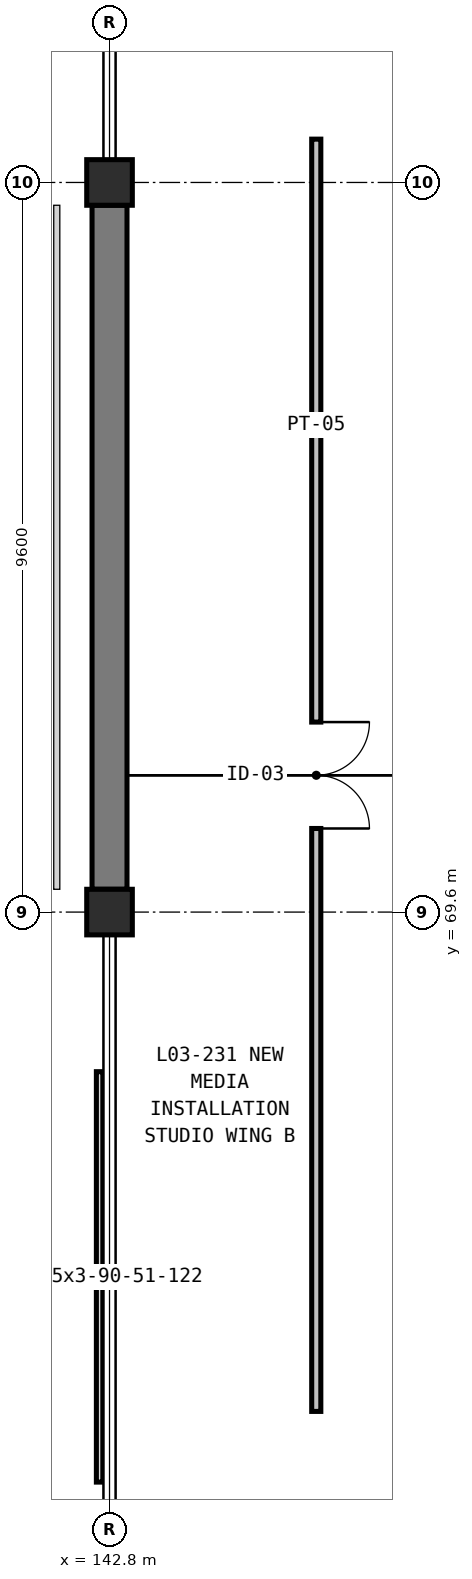
"""IFC4 building model, lengths in metres.
Left out: names, types, materials, properties, quantities, classifications, styles, units other than length and angle.
Written with IfcOpenShell. Run it as: python <this file> out.ifc"""

import sys

from ifc_helpers import new_model, si_unit, direction, frame, frame_2d, origin, origin_2d, place, context, subcontext, project, spatial, rectangle, extrude, element, fill, save


model = new_model("IFC4")
c1 = context("Model", 3, precision=1e-05, world=origin(), true_north=direction((0.0, 1.0)))
c2 = subcontext(c1, "Body", "Model", "MODEL_VIEW")
j1 = project(units=[si_unit("LENGTHUNIT", "METRE"), si_unit("PLANEANGLEUNIT", "RADIAN")], contexts=[c1])
p1 = place(None, origin())
s1 = spatial("IfcSite", under=j1, at=p1, CompositionType="ELEMENT")
p2 = place(p1, origin())
s2 = spatial("IfcBuilding", under=s1, at=p2, CompositionType="ELEMENT")
p3 = place(p2, frame((0.0, 0.0, 16.8)))
s3 = spatial("IfcBuildingStorey", under=s2, at=p3, CompositionType="ELEMENT", Elevation=16.8)
for number, where, z_axis, x_axis in (
    (1, (142.8, 69.6, 0.0), (0.0, 0.0, 1.0), (1.0, 0.0, 0.0)),
    (2, (142.8, 79.2, 0.0), (0.0, 0.0, 1.0), (1.0, 0.0, 0.0)),
):
    element("IfcColumn", number, at=place(p3, frame(where, z_axis=z_axis, x_axis=x_axis)), inside=s3, PredefinedType="COLUMN", context=c2, shape_type="SweptSolid", body=[
        extrude(rectangle(XDim=0.6, YDim=0.6, at=origin_2d()), origin(), (0.0, 0.0, 1.0), 5.4),
    ])
p4 = place(p3, frame((142.8, 69.9, 0.0), z_axis=(0.0, 0.0, 1.0), x_axis=(0.0, 1.0, 0.0)))
e3 = element("IfcWall", 3, at=p4, inside=s3, PredefinedType="SOLIDWALL", context=c2, shape_type="SweptSolid", body=[
    extrude(rectangle(XDim=9.0, YDim=0.46, at=frame_2d((4.5, 0.0))), origin(), (0.0, 0.0, 1.0), 5.1),
])
p5 = place(p3, frame((145.52, 79.77, 0.0), z_axis=(0.0, 0.0, 1.0), x_axis=(0.0, -1.0, 0.0)))
e4 = element("IfcWall", 4, at=p5, inside=s3, PredefinedType="PARTITIONING", context=c2, shape_type="SweptSolid", body=[
    extrude(rectangle(XDim=16.74, YDim=0.12, at=frame_2d((8.37, 0.0))), origin(), (0.0, 0.0, 1.0), 4.425),
])
p6 = place(p5, frame((7.67, 0.0, 0.0)))
e5 = element("IfcOpeningElement", 5, at=p6, cuts=e4, PredefinedType="OPENING", context=c2, shape_type="SweptSolid", body=[
    extrude(rectangle(XDim=1.4, YDim=2.3, at=frame_2d((0.7, 1.15))), frame((0.0, 0.07, 0.0), z_axis=(0.0, -1.0, 0.0), x_axis=(1.0, 0.0, 0.0)), (0.0, 0.0, 1.0), 0.14),
])
p7 = place(p6, origin())
e6 = element("IfcDoor", 6, at=p7, inside=s3, OperationType="DOUBLE_DOOR_SINGLE_SWING", PredefinedType="DOOR", context=c2, shape_type="SweptSolid", body=[
    extrude(rectangle(XDim=1.4, YDim=2.3, at=frame_2d((0.7, 1.15))), frame((0.0, 0.025, 0.0), z_axis=(0.0, -1.0, 0.0), x_axis=(1.0, 0.0, 0.0)), (0.0, 0.0, 1.0), 0.05),
])
fill(e5, e6)
save(model, sys.argv[1])
